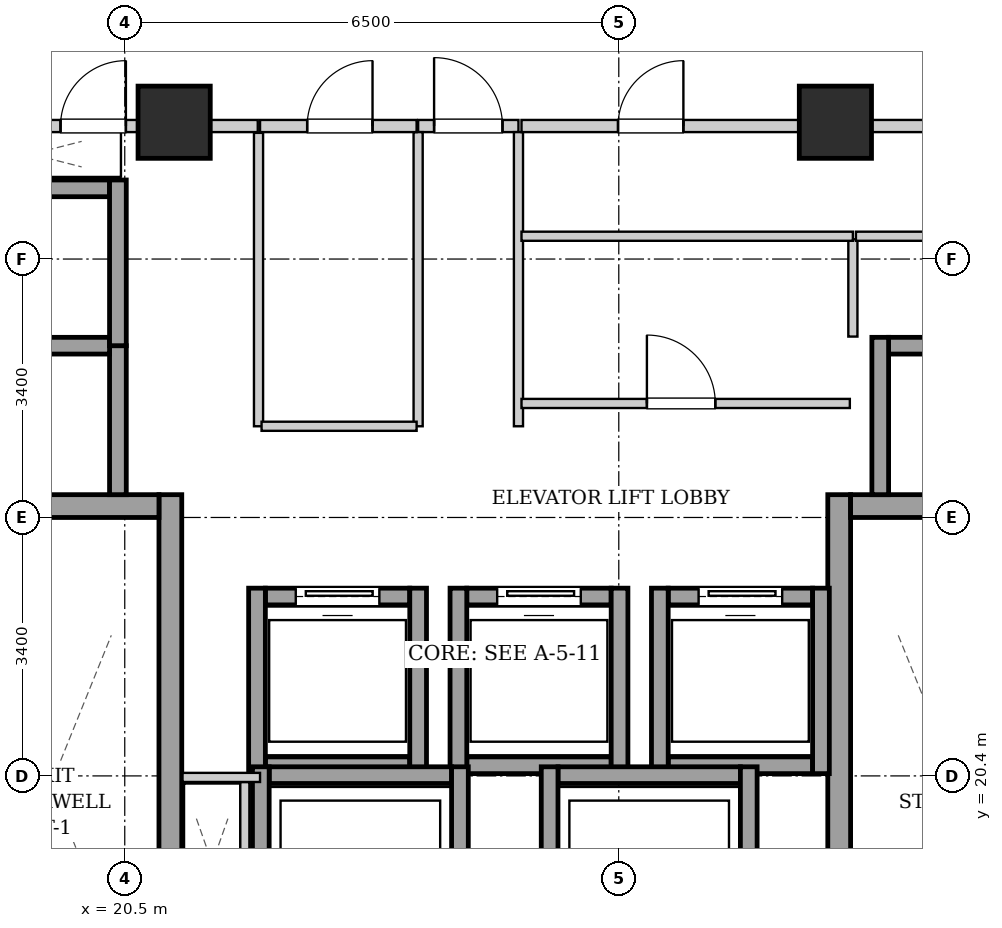
"""IFC4 building model, lengths in metres.
Left out: names, types, materials, properties, quantities, classifications, styles, units other than length and angle.
Written with IfcOpenShell. Run it as: python <this file> out.ifc"""

import sys

from ifc_helpers import new_model, si_unit, direction, frame, frame_2d, origin, origin_2d, place, context, subcontext, project, spatial, rectangle, extrude, element, fill, save


model = new_model("IFC4")
c1 = context("Model", 3, precision=1e-05, world=origin(), true_north=direction((0.0, 1.0)))
c2 = subcontext(c1, "Body", "Model", "MODEL_VIEW")
j1 = project(units=[si_unit("LENGTHUNIT", "METRE"), si_unit("PLANEANGLEUNIT", "RADIAN")], contexts=[c1])
p1 = place(None, origin())
s1 = spatial("IfcSite", under=j1, at=p1, CompositionType="ELEMENT")
p2 = place(p1, origin())
s2 = spatial("IfcBuilding", under=s1, at=p2, CompositionType="ELEMENT")
p3 = place(p2, frame((0.0, 0.0, 160.15)))
s3 = spatial("IfcBuildingStorey", under=s2, at=p3, CompositionType="ELEMENT", Elevation=160.15)
for number, where, z_axis, x_axis in (
    (1, (21.15, 29.0, 0.0), (0.0, 0.0, 1.0), (1.0, 0.0, 0.0)),
    (2, (29.85, 29.0, 0.0), (0.0, 0.0, 1.0), (1.0, 0.0, 0.0)),
):
    element("IfcColumn", number, at=place(p3, frame(where, z_axis=z_axis, x_axis=x_axis)), inside=s3, PredefinedType="COLUMN", context=c2, shape_type="SweptSolid", body=[
        extrude(rectangle(XDim=0.95, YDim=0.95, at=origin_2d()), origin(), (0.0, 0.0, 1.0), 3.25),
    ])
p4 = place(p3, frame((21.1, 15.1, 0.0), z_axis=(0.0, 0.0, 1.0), x_axis=(0.0, 1.0, 0.0)))
e3 = element("IfcWall", 3, at=p4, inside=s3, PredefinedType="SHEAR", context=c2, shape_type="SweptSolid", body=[
    extrude(rectangle(XDim=9.0, YDim=0.3, at=frame_2d((4.5, 0.0))), origin(), (0.0, 0.0, 1.0), 2.99),
])
p5 = place(p3, frame((18.1, 23.95, 0.0), z_axis=(0.0, 0.0, 1.0), x_axis=(1.0, 0.0, 0.0)))
e4 = element("IfcWall", 4, at=p5, inside=s3, PredefinedType="SHEAR", context=c2, shape_type="SweptSolid", body=[
    extrude(rectangle(XDim=2.85, YDim=0.3, at=frame_2d((1.425, 0.0))), origin(), (0.0, 0.0, 1.0), 2.99),
])
p6 = place(p3, frame((29.9, 15.1, 0.0), z_axis=(0.0, 0.0, 1.0), x_axis=(0.0, 1.0, 0.0)))
e5 = element("IfcWall", 5, at=p6, inside=s3, PredefinedType="SHEAR", context=c2, shape_type="SweptSolid", body=[
    extrude(rectangle(XDim=9.0, YDim=0.3, at=frame_2d((4.5, 0.0))), origin(), (0.0, 0.0, 1.0), 2.99),
])
p7 = place(p3, frame((30.05, 23.95, 0.0), z_axis=(0.0, 0.0, 1.0), x_axis=(1.0, 0.0, 0.0)))
e6 = element("IfcWall", 6, at=p7, inside=s3, PredefinedType="SHEAR", context=c2, shape_type="SweptSolid", body=[
    extrude(rectangle(XDim=2.85, YDim=0.3, at=frame_2d((1.425, 0.0))), origin(), (0.0, 0.0, 1.0), 2.99),
])
p8 = place(p3, frame((22.35, 20.54, 0.0), z_axis=(0.0, 0.0, 1.0), x_axis=(1.0, 0.0, 0.0)))
e7 = element("IfcWall", 7, at=p8, inside=s3, PredefinedType="SHEAR", context=c2, shape_type="SweptSolid", body=[
    extrude(rectangle(XDim=1.9, YDim=0.22, at=frame_2d((0.95, 0.0))), origin(), (0.0, 0.0, 1.0), 2.99),
])
p9 = place(p3, frame((22.35, 22.76, 0.0), z_axis=(0.0, 0.0, 1.0), x_axis=(1.0, 0.0, 0.0)))
e8 = element("IfcWall", 8, at=p9, inside=s3, PredefinedType="SHEAR", context=c2, shape_type="SweptSolid", body=[
    extrude(rectangle(XDim=1.9, YDim=0.22, at=frame_2d((0.95, 0.0))), origin(), (0.0, 0.0, 1.0), 2.99),
])
p10 = place(p9, frame((0.4, 0.0, 0.0)))
e9 = element("IfcOpeningElement", 9, at=p10, cuts=e8, PredefinedType="OPENING", context=c2, shape_type="SweptSolid", body=[
    extrude(rectangle(XDim=1.1, YDim=2.15, at=frame_2d((0.55, 1.075))), frame((0.0, 0.12, 0.0), z_axis=(0.0, -1.0, 0.0), x_axis=(1.0, 0.0, 0.0)), (0.0, 0.0, 1.0), 0.24),
])
for number, where, z_axis, x_axis in (
    (10, (22.24, 20.43, 0.0), (0.0, 0.0, 1.0), (0.0, 1.0, 0.0)),
    (11, (24.36, 20.43, 0.0), (0.0, 0.0, 1.0), (0.0, 1.0, 0.0)),
):
    element("IfcWall", number, at=place(p3, frame(where, z_axis=z_axis, x_axis=x_axis)), inside=s3, PredefinedType="SHEAR", context=c2, shape_type="SweptSolid", body=[
        extrude(rectangle(XDim=2.44, YDim=0.22, at=frame_2d((1.22, 0.0))), origin(), (0.0, 0.0, 1.0), 2.99),
    ])
p11 = place(p3, frame((25.0, 20.54, 0.0), z_axis=(0.0, 0.0, 1.0), x_axis=(1.0, 0.0, 0.0)))
e12 = element("IfcWall", 12, at=p11, inside=s3, PredefinedType="SHEAR", context=c2, shape_type="SweptSolid", body=[
    extrude(rectangle(XDim=1.9, YDim=0.22, at=frame_2d((0.95, 0.0))), origin(), (0.0, 0.0, 1.0), 2.99),
])
p12 = place(p3, frame((25.0, 22.76, 0.0), z_axis=(0.0, 0.0, 1.0), x_axis=(1.0, 0.0, 0.0)))
e13 = element("IfcWall", 13, at=p12, inside=s3, PredefinedType="SHEAR", context=c2, shape_type="SweptSolid", body=[
    extrude(rectangle(XDim=1.9, YDim=0.22, at=frame_2d((0.95, 0.0))), origin(), (0.0, 0.0, 1.0), 2.99),
])
p13 = place(p12, frame((0.4, 0.0, 0.0)))
e14 = element("IfcOpeningElement", 14, at=p13, cuts=e13, PredefinedType="OPENING", context=c2, shape_type="SweptSolid", body=[
    extrude(rectangle(XDim=1.1, YDim=2.15, at=frame_2d((0.55, 1.075))), frame((0.0, 0.12, 0.0), z_axis=(0.0, -1.0, 0.0), x_axis=(1.0, 0.0, 0.0)), (0.0, 0.0, 1.0), 0.24),
])
for number, where, z_axis, x_axis in (
    (15, (24.89, 20.43, 0.0), (0.0, 0.0, 1.0), (0.0, 1.0, 0.0)),
    (16, (27.01, 20.43, 0.0), (0.0, 0.0, 1.0), (0.0, 1.0, 0.0)),
):
    element("IfcWall", number, at=place(p3, frame(where, z_axis=z_axis, x_axis=x_axis)), inside=s3, PredefinedType="SHEAR", context=c2, shape_type="SweptSolid", body=[
        extrude(rectangle(XDim=2.44, YDim=0.22, at=frame_2d((1.22, 0.0))), origin(), (0.0, 0.0, 1.0), 2.99),
    ])
p14 = place(p3, frame((27.65, 20.54, 0.0), z_axis=(0.0, 0.0, 1.0), x_axis=(1.0, 0.0, 0.0)))
e17 = element("IfcWall", 17, at=p14, inside=s3, PredefinedType="SHEAR", context=c2, shape_type="SweptSolid", body=[
    extrude(rectangle(XDim=1.9, YDim=0.22, at=frame_2d((0.95, 0.0))), origin(), (0.0, 0.0, 1.0), 2.99),
])
p15 = place(p3, frame((27.65, 22.76, 0.0), z_axis=(0.0, 0.0, 1.0), x_axis=(1.0, 0.0, 0.0)))
e18 = element("IfcWall", 18, at=p15, inside=s3, PredefinedType="SHEAR", context=c2, shape_type="SweptSolid", body=[
    extrude(rectangle(XDim=1.9, YDim=0.22, at=frame_2d((0.95, 0.0))), origin(), (0.0, 0.0, 1.0), 2.99),
])
p16 = place(p15, frame((0.4, 0.0, 0.0)))
e19 = element("IfcOpeningElement", 19, at=p16, cuts=e18, PredefinedType="OPENING", context=c2, shape_type="SweptSolid", body=[
    extrude(rectangle(XDim=1.1, YDim=2.15, at=frame_2d((0.55, 1.075))), frame((0.0, 0.12, 0.0), z_axis=(0.0, -1.0, 0.0), x_axis=(1.0, 0.0, 0.0)), (0.0, 0.0, 1.0), 0.24),
])
for number, where, z_axis, x_axis in (
    (20, (27.54, 20.43, 0.0), (0.0, 0.0, 1.0), (0.0, 1.0, 0.0)),
    (21, (29.66, 20.43, 0.0), (0.0, 0.0, 1.0), (0.0, 1.0, 0.0)),
):
    element("IfcWall", number, at=place(p3, frame(where, z_axis=z_axis, x_axis=x_axis)), inside=s3, PredefinedType="SHEAR", context=c2, shape_type="SweptSolid", body=[
        extrude(rectangle(XDim=2.44, YDim=0.22, at=frame_2d((1.22, 0.0))), origin(), (0.0, 0.0, 1.0), 2.99),
    ])
p17 = place(p3, frame((20.41, 24.1, 0.0), z_axis=(0.0, 0.0, 1.0), x_axis=(0.0, 1.0, 0.0)))
e22 = element("IfcWall", 22, at=p17, inside=s3, PredefinedType="SHEAR", context=c2, shape_type="SweptSolid", body=[
    extrude(rectangle(XDim=1.96, YDim=0.22, at=frame_2d((0.98, 0.0))), origin(), (0.0, 0.0, 1.0), 2.99),
])
for number, where, z_axis, x_axis in (
    (23, (18.4, 26.06, 0.0), (0.0, 0.0, 1.0), (1.0, 0.0, 0.0)),
    (24, (18.4, 28.13, 0.0), (0.0, 0.0, 1.0), (1.0, 0.0, 0.0)),
):
    element("IfcWall", number, at=place(p3, frame(where, z_axis=z_axis, x_axis=x_axis)), inside=s3, PredefinedType="SHEAR", context=c2, shape_type="SweptSolid", body=[
        extrude(rectangle(XDim=1.9, YDim=0.22, at=frame_2d((0.95, 0.0))), origin(), (0.0, 0.0, 1.0), 2.99),
    ])
p18 = place(p3, frame((20.41, 26.06, 0.0), z_axis=(0.0, 0.0, 1.0), x_axis=(0.0, 1.0, 0.0)))
e25 = element("IfcWall", 25, at=p18, inside=s3, PredefinedType="SHEAR", context=c2, shape_type="SweptSolid", body=[
    extrude(rectangle(XDim=2.18, YDim=0.22, at=frame_2d((1.09, 0.0))), origin(), (0.0, 0.0, 1.0), 2.99),
])
p19 = place(p3, frame((30.55, 26.06, 0.0), z_axis=(0.0, 0.0, 1.0), x_axis=(1.0, 0.0, 0.0)))
e26 = element("IfcWall", 26, at=p19, inside=s3, PredefinedType="SHEAR", context=c2, shape_type="SweptSolid", body=[
    extrude(rectangle(XDim=1.9, YDim=0.22, at=frame_2d((0.95, 0.0))), origin(), (0.0, 0.0, 1.0), 2.99),
])
p20 = place(p3, frame((30.44, 24.1, 0.0), z_axis=(0.0, 0.0, 1.0), x_axis=(0.0, 1.0, 0.0)))
e27 = element("IfcWall", 27, at=p20, inside=s3, PredefinedType="SHEAR", context=c2, shape_type="SweptSolid", body=[
    extrude(rectangle(XDim=2.07, YDim=0.22, at=frame_2d((1.035, 0.0))), origin(), (0.0, 0.0, 1.0), 2.99),
])
p21 = place(p3, frame((22.4, 20.41, 0.0), z_axis=(0.0, 0.0, 1.0), x_axis=(1.0, 0.0, 0.0)))
e28 = element("IfcWall", 28, at=p21, inside=s3, PredefinedType="SHEAR", context=c2, shape_type="SweptSolid", body=[
    extrude(rectangle(XDim=2.4, YDim=0.22, at=frame_2d((1.2, 0.0))), origin(), (0.0, 0.0, 1.0), 2.99),
])
for number, where, z_axis, x_axis in (
    (29, (22.29, 17.98, 0.0), (0.0, 0.0, 1.0), (0.0, 1.0, 0.0)),
    (30, (24.91, 17.98, 0.0), (0.0, 0.0, 1.0), (0.0, 1.0, 0.0)),
):
    element("IfcWall", number, at=place(p3, frame(where, z_axis=z_axis, x_axis=x_axis)), inside=s3, PredefinedType="SHEAR", context=c2, shape_type="SweptSolid", body=[
        extrude(rectangle(XDim=2.54, YDim=0.22, at=frame_2d((1.27, 0.0))), origin(), (0.0, 0.0, 1.0), 2.99),
    ])
p22 = place(p3, frame((26.2, 20.41, 0.0), z_axis=(0.0, 0.0, 1.0), x_axis=(1.0, 0.0, 0.0)))
e31 = element("IfcWall", 31, at=p22, inside=s3, PredefinedType="SHEAR", context=c2, shape_type="SweptSolid", body=[
    extrude(rectangle(XDim=2.4, YDim=0.22, at=frame_2d((1.2, 0.0))), origin(), (0.0, 0.0, 1.0), 2.99),
])
for number, where, z_axis, x_axis in (
    (32, (26.09, 17.98, 0.0), (0.0, 0.0, 1.0), (0.0, 1.0, 0.0)),
    (33, (28.71, 17.98, 0.0), (0.0, 0.0, 1.0), (0.0, 1.0, 0.0)),
):
    element("IfcWall", number, at=place(p3, frame(where, z_axis=z_axis, x_axis=x_axis)), inside=s3, PredefinedType="SHEAR", context=c2, shape_type="SweptSolid", body=[
        extrude(rectangle(XDim=2.54, YDim=0.22, at=frame_2d((1.27, 0.0))), origin(), (0.0, 0.0, 1.0), 2.99),
    ])
p23 = place(p3, frame((24.36, 28.95, 0.0), z_axis=(0.0, 0.0, 1.0), x_axis=(1.0, 0.0, 0.0)))
e34 = element("IfcWall", 34, at=p23, inside=s3, PredefinedType="PARTITIONING", context=c2, shape_type="SweptSolid", body=[
    extrude(rectangle(XDim=1.32, YDim=0.16, at=frame_2d((0.66, 0.0))), origin(), (0.0, 0.0, 1.0), 2.442),
])
p24 = place(p23, frame((0.21, 0.0, 0.0)))
e35 = element("IfcOpeningElement", 35, at=p24, cuts=e34, PredefinedType="OPENING", context=c2, shape_type="SweptSolid", body=[
    extrude(rectangle(XDim=0.9, YDim=2.05, at=frame_2d((0.45, 1.025))), frame((0.0, 0.09, 0.0), z_axis=(0.0, -1.0, 0.0), x_axis=(1.0, 0.0, 0.0)), (0.0, 0.0, 1.0), 0.18),
])
p25 = place(p3, frame((17.96, 28.95, 0.0), z_axis=(0.0, 0.0, 1.0), x_axis=(1.0, 0.0, 0.0)))
e36 = element("IfcWall", 36, at=p25, inside=s3, PredefinedType="PARTITIONING", context=c2, shape_type="SweptSolid", body=[
    extrude(rectangle(XDim=4.29, YDim=0.16, at=frame_2d((2.145, 0.0))), origin(), (0.0, 0.0, 1.0), 2.442),
])
p26 = place(p25, frame((1.695, 0.0, 0.0)))
e37 = element("IfcOpeningElement", 37, at=p26, cuts=e36, PredefinedType="OPENING", context=c2, shape_type="SweptSolid", body=[
    extrude(rectangle(XDim=0.86, YDim=2.05, at=frame_2d((0.43, 1.025))), frame((0.0, 0.09, 0.0), z_axis=(0.0, -1.0, 0.0), x_axis=(1.0, 0.0, 0.0)), (0.0, 0.0, 1.0), 0.18),
])
p27 = place(p3, frame((22.08, 18.2, 0.0), z_axis=(0.0, 0.0, 1.0), x_axis=(0.0, 1.0, 0.0)))
e38 = element("IfcWall", 38, at=p27, inside=s3, PredefinedType="PARTITIONING", context=c2, shape_type="SweptSolid", body=[
    extrude(rectangle(XDim=2.12, YDim=0.12, at=frame_2d((1.06, 0.0))), origin(), (0.0, 0.0, 1.0), 2.99),
])
p28 = place(p3, frame((22.28, 20.38, 0.0), z_axis=(0.0, 0.0, 1.0), x_axis=(-1.0, 0.0, 0.0)))
e39 = element("IfcWall", 39, at=p28, inside=s3, PredefinedType="PARTITIONING", context=c2, shape_type="SweptSolid", body=[
    extrude(rectangle(XDim=1.02, YDim=0.12, at=frame_2d((0.51, 0.0))), origin(), (0.0, 0.0, 1.0), 2.99),
])
for number, where, z_axis, x_axis in (
    (40, (24.36, 25.0, 0.0), (0.0, 0.0, 1.0), (0.0, 1.0, 0.0)),
    (41, (25.68, 25.0, 0.0), (0.0, 0.0, 1.0), (0.0, 1.0, 0.0)),
):
    element("IfcWall", number, at=place(p3, frame(where, z_axis=z_axis, x_axis=x_axis)), inside=s3, PredefinedType="PARTITIONING", context=c2, shape_type="SweptSolid", body=[
        extrude(rectangle(XDim=3.87, YDim=0.12, at=frame_2d((1.935, 0.0))), origin(), (0.0, 0.0, 1.0), 2.99),
    ])
p29 = place(p3, frame((30.08, 26.18, 0.0), z_axis=(0.0, 0.0, 1.0), x_axis=(0.0, 1.0, 0.0)))
e42 = element("IfcWall", 42, at=p29, inside=s3, PredefinedType="PARTITIONING", context=c2, shape_type="SweptSolid", body=[
    extrude(rectangle(XDim=1.28, YDim=0.12, at=frame_2d((0.64, 0.0))), origin(), (0.0, 0.0, 1.0), 2.99),
])
p30 = place(p3, frame((30.12, 27.5, 0.0), z_axis=(0.0, 0.0, 1.0), x_axis=(1.0, 0.0, 0.0)))
e43 = element("IfcWall", 43, at=p30, inside=s3, PredefinedType="PARTITIONING", context=c2, shape_type="SweptSolid", body=[
    extrude(rectangle(XDim=2.92, YDim=0.12, at=frame_2d((1.46, 0.0))), origin(), (0.0, 0.0, 1.0), 2.99),
])
p31 = place(p30, frame((0.97, 0.0, 0.0)))
e44 = element("IfcOpeningElement", 44, at=p31, cuts=e43, PredefinedType="OPENING", context=c2, shape_type="SweptSolid", body=[
    extrude(rectangle(XDim=0.86, YDim=2.05, at=frame_2d((0.43, 1.025))), frame((0.0, 0.07, 0.0), z_axis=(0.0, -1.0, 0.0), x_axis=(1.0, 0.0, 0.0)), (0.0, 0.0, 1.0), 0.14),
])
p32 = place(p3, frame((22.26, 25.0, 0.0), z_axis=(0.0, 0.0, 1.0), x_axis=(0.0, 1.0, 0.0)))
e45 = element("IfcWall", 45, at=p32, inside=s3, PredefinedType="PARTITIONING", context=c2, shape_type="SweptSolid", body=[
    extrude(rectangle(XDim=3.86, YDim=0.12, at=frame_2d((1.93, 0.0))), origin(), (0.0, 0.0, 1.0), 2.99),
])
p33 = place(p3, frame((22.3, 25.0, 0.0), z_axis=(0.0, 0.0, 1.0), x_axis=(1.0, 0.0, 0.0)))
e46 = element("IfcWall", 46, at=p33, inside=s3, PredefinedType="PARTITIONING", context=c2, shape_type="SweptSolid", body=[
    extrude(rectangle(XDim=2.04, YDim=0.12, at=frame_2d((1.02, 0.0))), origin(), (0.0, 0.0, 1.0), 2.99),
])
p34 = place(p3, frame((22.28, 28.95, 0.0), z_axis=(0.0, 0.0, 1.0), x_axis=(1.0, 0.0, 0.0)))
e47 = element("IfcWall", 47, at=p34, inside=s3, PredefinedType="PARTITIONING", context=c2, shape_type="SweptSolid", body=[
    extrude(rectangle(XDim=2.06, YDim=0.16, at=frame_2d((1.03, 0.0))), origin(), (0.0, 0.0, 1.0), 2.442),
])
p35 = place(p34, frame((0.62, 0.0, 0.0)))
e48 = element("IfcOpeningElement", 48, at=p35, cuts=e47, PredefinedType="OPENING", context=c2, shape_type="SweptSolid", body=[
    extrude(rectangle(XDim=0.86, YDim=2.05, at=frame_2d((0.43, 1.025))), frame((0.0, 0.09, 0.0), z_axis=(0.0, -1.0, 0.0), x_axis=(1.0, 0.0, 0.0)), (0.0, 0.0, 1.0), 0.18),
])
p36 = place(p3, frame((25.72, 27.5, 0.0), z_axis=(0.0, 0.0, 1.0), x_axis=(1.0, 0.0, 0.0)))
e49 = element("IfcWall", 49, at=p36, inside=s3, PredefinedType="PARTITIONING", context=c2, shape_type="SweptSolid", body=[
    extrude(rectangle(XDim=4.36, YDim=0.12, at=frame_2d((2.18, 0.0))), origin(), (0.0, 0.0, 1.0), 2.99),
])
p37 = place(p3, frame((25.72, 25.3, 0.0), z_axis=(0.0, 0.0, 1.0), x_axis=(1.0, 0.0, 0.0)))
e50 = element("IfcWall", 50, at=p37, inside=s3, PredefinedType="PARTITIONING", context=c2, shape_type="SweptSolid", body=[
    extrude(rectangle(XDim=4.32, YDim=0.12, at=frame_2d((2.16, 0.0))), origin(), (0.0, 0.0, 1.0), 2.99),
])
p38 = place(p37, frame((1.65, 0.0, 0.0)))
e51 = element("IfcOpeningElement", 51, at=p38, cuts=e50, PredefinedType="OPENING", context=c2, shape_type="SweptSolid", body=[
    extrude(rectangle(XDim=0.9, YDim=2.05, at=frame_2d((0.45, 1.025))), frame((0.0, 0.07, 0.0), z_axis=(0.0, -1.0, 0.0), x_axis=(1.0, 0.0, 0.0)), (0.0, 0.0, 1.0), 0.14),
])
p39 = place(p3, frame((25.72, 28.95, 0.0), z_axis=(0.0, 0.0, 1.0), x_axis=(1.0, 0.0, 0.0)))
e52 = element("IfcWall", 52, at=p39, inside=s3, PredefinedType="PARTITIONING", context=c2, shape_type="SweptSolid", body=[
    extrude(rectangle(XDim=7.32, YDim=0.16, at=frame_2d((3.66, 0.0))), origin(), (0.0, 0.0, 1.0), 2.442),
])
p40 = place(p39, frame((1.27, 0.0, 0.0)))
e53 = element("IfcOpeningElement", 53, at=p40, cuts=e52, PredefinedType="OPENING", context=c2, shape_type="SweptSolid", body=[
    extrude(rectangle(XDim=0.86, YDim=2.05, at=frame_2d((0.43, 1.025))), frame((0.0, 0.09, 0.0), z_axis=(0.0, -1.0, 0.0), x_axis=(1.0, 0.0, 0.0)), (0.0, 0.0, 1.0), 0.18),
])
p41 = place(p10, origin())
e54 = element("IfcDoor", 54, at=p41, inside=s3, OperationType="SLIDING_TO_LEFT", PredefinedType="DOOR", context=c2, shape_type="SweptSolid", body=[
    extrude(rectangle(XDim=1.1, YDim=2.15, at=frame_2d((0.55, 1.075))), frame((0.0, 0.025, 0.0), z_axis=(0.0, -1.0, 0.0), x_axis=(1.0, 0.0, 0.0)), (0.0, 0.0, 1.0), 0.05),
])
fill(e9, e54)
p42 = place(p13, origin())
e55 = element("IfcDoor", 55, at=p42, inside=s3, OperationType="SLIDING_TO_LEFT", PredefinedType="DOOR", context=c2, shape_type="SweptSolid", body=[
    extrude(rectangle(XDim=1.1, YDim=2.15, at=frame_2d((0.55, 1.075))), frame((0.0, 0.025, 0.0), z_axis=(0.0, -1.0, 0.0), x_axis=(1.0, 0.0, 0.0)), (0.0, 0.0, 1.0), 0.05),
])
fill(e14, e55)
p43 = place(p16, origin())
e56 = element("IfcDoor", 56, at=p43, inside=s3, OperationType="SLIDING_TO_LEFT", PredefinedType="DOOR", context=c2, shape_type="SweptSolid", body=[
    extrude(rectangle(XDim=1.1, YDim=2.15, at=frame_2d((0.55, 1.075))), frame((0.0, 0.025, 0.0), z_axis=(0.0, -1.0, 0.0), x_axis=(1.0, 0.0, 0.0)), (0.0, 0.0, 1.0), 0.05),
])
fill(e19, e56)
p44 = place(p24, origin())
e57 = element("IfcDoor", 57, at=p44, inside=s3, OperationType="SINGLE_SWING_LEFT", PredefinedType="DOOR", context=c2, shape_type="SweptSolid", body=[
    extrude(rectangle(XDim=0.9, YDim=2.05, at=frame_2d((0.45, 1.025))), frame((0.0, 0.025, 0.0), z_axis=(0.0, -1.0, 0.0), x_axis=(1.0, 0.0, 0.0)), (0.0, 0.0, 1.0), 0.05),
])
fill(e35, e57)
p45 = place(p26, origin())
e58 = element("IfcDoor", 58, at=p45, inside=s3, OperationType="SINGLE_SWING_RIGHT", PredefinedType="DOOR", context=c2, shape_type="SweptSolid", body=[
    extrude(rectangle(XDim=0.86, YDim=2.05, at=frame_2d((0.43, 1.025))), frame((0.0, 0.025, 0.0), z_axis=(0.0, -1.0, 0.0), x_axis=(1.0, 0.0, 0.0)), (0.0, 0.0, 1.0), 0.05),
])
fill(e37, e58)
p46 = place(p35, origin())
e59 = element("IfcDoor", 59, at=p46, inside=s3, OperationType="SINGLE_SWING_RIGHT", PredefinedType="DOOR", context=c2, shape_type="SweptSolid", body=[
    extrude(rectangle(XDim=0.86, YDim=2.05, at=frame_2d((0.43, 1.025))), frame((0.0, 0.025, 0.0), z_axis=(0.0, -1.0, 0.0), x_axis=(1.0, 0.0, 0.0)), (0.0, 0.0, 1.0), 0.05),
])
fill(e48, e59)
p47 = place(p38, origin())
e60 = element("IfcDoor", 60, at=p47, inside=s3, OperationType="SINGLE_SWING_LEFT", PredefinedType="DOOR", context=c2, shape_type="SweptSolid", body=[
    extrude(rectangle(XDim=0.9, YDim=2.05, at=frame_2d((0.45, 1.025))), frame((0.0, 0.025, 0.0), z_axis=(0.0, -1.0, 0.0), x_axis=(1.0, 0.0, 0.0)), (0.0, 0.0, 1.0), 0.05),
])
fill(e51, e60)
p48 = place(p40, origin())
e61 = element("IfcDoor", 61, at=p48, inside=s3, OperationType="SINGLE_SWING_RIGHT", PredefinedType="DOOR", context=c2, shape_type="SweptSolid", body=[
    extrude(rectangle(XDim=0.86, YDim=2.05, at=frame_2d((0.43, 1.025))), frame((0.0, 0.025, 0.0), z_axis=(0.0, -1.0, 0.0), x_axis=(1.0, 0.0, 0.0)), (0.0, 0.0, 1.0), 0.05),
])
fill(e53, e61)
save(model, sys.argv[1])
